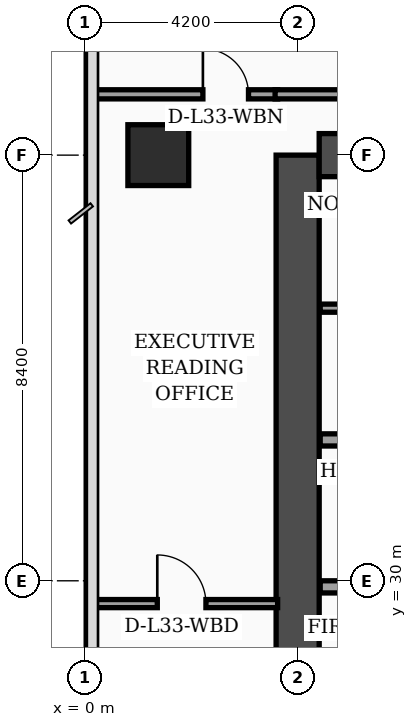
"""IFC4 building model, lengths in metres.
Left out: names, types, materials, properties, quantities, classifications, styles, units other than length and angle.
Written with IfcOpenShell. Run it as: python <this file> out.ifc"""

import sys

from ifc_helpers import new_model, si_unit, direction, frame, frame_2d, origin, origin_2d, place, context, subcontext, project, spatial, rectangle, extrude, element, fill, save


model = new_model("IFC4")
c1 = context("Model", 3, precision=1e-05, world=origin(), true_north=direction((0.0, 1.0)))
c2 = subcontext(c1, "Body", "Model", "MODEL_VIEW")
j1 = project(units=[si_unit("LENGTHUNIT", "METRE"), si_unit("PLANEANGLEUNIT", "RADIAN")], contexts=[c1])
p1 = place(None, origin())
s1 = spatial("IfcSite", under=j1, at=p1, CompositionType="ELEMENT")
p2 = place(p1, origin())
s2 = spatial("IfcBuilding", under=s1, at=p2, CompositionType="ELEMENT")
p3 = place(p2, frame((0.0, 0.0, 135.4)))
s3 = spatial("IfcBuildingStorey", under=s2, at=p3, CompositionType="ELEMENT", Elevation=135.4)
p4 = place(p3, frame((4.2, 16.8, 0.0), z_axis=(0.0, 0.0, 1.0), x_axis=(0.0, 1.0, 0.0)))
e1 = element("IfcWall", 1, at=p4, inside=s3, PredefinedType="SHEAR", context=c2, shape_type="SweptSolid", body=[
    extrude(rectangle(XDim=21.6, YDim=0.85, at=frame_2d((10.8, 0.0))), origin(), (0.0, 0.0, 1.0), 3.52),
])
p5 = place(p3, frame((4.625, 38.4, 0.0), z_axis=(0.0, 0.0, 1.0), x_axis=(1.0, 0.0, 0.0)))
e2 = element("IfcWall", 2, at=p5, inside=s3, PredefinedType="SHEAR", context=c2, shape_type="SweptSolid", body=[
    extrude(rectangle(XDim=9.95, YDim=0.85, at=frame_2d((4.975, 0.0))), origin(), (0.0, 0.0, 1.0), 3.52),
])
p6 = place(p3, frame((1.45, 38.4, 0.0), z_axis=(0.0, 0.0, 1.0), x_axis=(1.0, 0.0, 0.0)))
e3 = element("IfcColumn", 3, at=p6, inside=s3, PredefinedType="COLUMN", context=c2, shape_type="SweptSolid", body=[
    extrude(rectangle(XDim=1.2, YDim=1.2, at=origin_2d()), origin(), (0.0, 0.0, 1.0), 3.52),
])
p7 = place(p3, frame((4.645, 29.88, 0.0), z_axis=(0.0, 0.0, 1.0), x_axis=(1.0, 0.0, 0.0)))
e4 = element("IfcWall", 4, at=p7, inside=s3, PredefinedType="SOLIDWALL", context=c2, shape_type="SweptSolid", body=[
    extrude(rectangle(XDim=4.775, YDim=0.24, at=frame_2d((2.387, 0.0))), origin(), (0.0, 0.0, 1.0), 3.52),
])
p8 = place(p7, frame((0.45, 0.0, 0.0)))
e5 = element("IfcOpeningElement", 5, at=p8, cuts=e4, PredefinedType="OPENING", context=c2, shape_type="SweptSolid", body=[
    extrude(rectangle(XDim=1.3, YDim=2.35, at=frame_2d((0.65, 1.175))), frame((0.0, 0.13, 0.0), z_axis=(0.0, -1.0, 0.0), x_axis=(1.0, 0.0, 0.0)), (0.0, 0.0, 1.0), 0.26),
])
p9 = place(p3, frame((4.645, 32.78, 0.0), z_axis=(0.0, 0.0, 1.0), x_axis=(1.0, 0.0, 0.0)))
e6 = element("IfcWall", 6, at=p9, inside=s3, PredefinedType="SOLIDWALL", context=c2, shape_type="SweptSolid", body=[
    extrude(rectangle(XDim=4.775, YDim=0.24, at=frame_2d((2.387, 0.0))), origin(), (0.0, 0.0, 1.0), 3.17),
])
p10 = place(p3, frame((4.645, 35.38, 0.0), z_axis=(0.0, 0.0, 1.0), x_axis=(1.0, 0.0, 0.0)))
e7 = element("IfcWall", 7, at=p10, inside=s3, PredefinedType="PARTITIONING", context=c2, shape_type="SweptSolid", body=[
    extrude(rectangle(XDim=4.775, YDim=0.16, at=frame_2d((2.387, 0.0))), origin(), (0.0, 0.0, 1.0), 3.52),
])
p11 = place(p10, frame((1.3, 0.0, 0.0)))
e8 = element("IfcOpeningElement", 8, at=p11, cuts=e7, PredefinedType="OPENING", context=c2, shape_type="SweptSolid", body=[
    extrude(rectangle(XDim=0.98, YDim=2.15, at=frame_2d((0.49, 1.075))), frame((0.0, 0.09, 0.0), z_axis=(0.0, -1.0, 0.0), x_axis=(1.0, 0.0, 0.0)), (0.0, 0.0, 1.0), 0.18),
])
p12 = place(p3, frame((0.08, 29.55, 0.0), z_axis=(0.0, 0.0, 1.0), x_axis=(1.0, 0.0, 0.0)))
e9 = element("IfcWall", 9, at=p12, inside=s3, PredefinedType="PARTITIONING", context=c2, shape_type="SweptSolid", body=[
    extrude(rectangle(XDim=3.725, YDim=0.16, at=frame_2d((1.862, 0.0))), origin(), (0.0, 0.0, 1.0), 3.02),
])
p13 = place(p12, frame((1.35, 0.0, 0.0)))
e10 = element("IfcOpeningElement", 10, at=p13, cuts=e9, PredefinedType="OPENING", context=c2, shape_type="SweptSolid", body=[
    extrude(rectangle(XDim=0.96, YDim=2.2, at=frame_2d((0.48, 1.1))), frame((0.0, 0.09, 0.0), z_axis=(0.0, -1.0, 0.0), x_axis=(1.0, 0.0, 0.0)), (0.0, 0.0, 1.0), 0.18),
])
p14 = place(p3, frame((0.08, 39.6, 0.0), z_axis=(0.0, 0.0, 1.0), x_axis=(1.0, 0.0, 0.0)))
e11 = element("IfcWall", 11, at=p14, inside=s3, PredefinedType="PARTITIONING", context=c2, shape_type="SweptSolid", body=[
    extrude(rectangle(XDim=3.725, YDim=0.18, at=frame_2d((1.862, 0.0))), origin(), (0.0, 0.0, 1.0), 2.82),
])
p15 = place(p14, frame((2.25, 0.0, 0.0)))
e12 = element("IfcOpeningElement", 12, at=p15, cuts=e11, PredefinedType="OPENING", context=c2, shape_type="SweptSolid", body=[
    extrude(rectangle(XDim=0.9, YDim=2.15, at=frame_2d((0.45, 1.075))), frame((0.0, 0.1, 0.0), z_axis=(0.0, -1.0, 0.0), x_axis=(1.0, 0.0, 0.0)), (0.0, 0.0, 1.0), 0.2),
])
p16 = place(p3, frame((3.755, 39.6, 0.0), z_axis=(0.0, 0.0, 1.0), x_axis=(1.0, 0.0, 0.0)))
e13 = element("IfcWall", 13, at=p16, inside=s3, PredefinedType="PARTITIONING", context=c2, shape_type="SweptSolid", body=[
    extrude(rectangle(XDim=11.395, YDim=0.18, at=frame_2d((5.698, 0.0))), origin(), (0.0, 0.0, 1.0), 2.82),
])
p17 = place(p13, origin())
e14 = element("IfcDoor", 14, at=p17, inside=s3, OperationType="SINGLE_SWING_LEFT", PredefinedType="DOOR", context=c2, shape_type="SweptSolid", body=[
    extrude(rectangle(XDim=0.96, YDim=2.2, at=frame_2d((0.48, 1.1))), frame((0.0, 0.025, 0.0), z_axis=(0.0, -1.0, 0.0), x_axis=(1.0, 0.0, 0.0)), (0.0, 0.0, 1.0), 0.05),
])
fill(e10, e14)
p18 = place(p15, origin())
e15 = element("IfcDoor", 15, at=p18, inside=s3, OperationType="SINGLE_SWING_LEFT", PredefinedType="DOOR", context=c2, shape_type="SweptSolid", body=[
    extrude(rectangle(XDim=0.9, YDim=2.15, at=frame_2d((0.45, 1.075))), frame((0.0, 0.025, 0.0), z_axis=(0.0, -1.0, 0.0), x_axis=(1.0, 0.0, 0.0)), (0.0, 0.0, 1.0), 0.05),
])
fill(e12, e15)
save(model, sys.argv[1])
